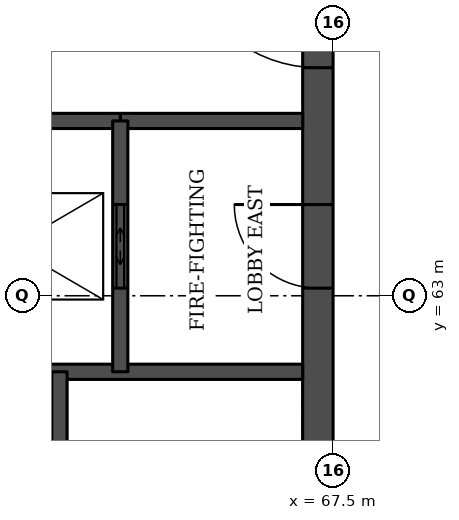
"""IFC4 building model, lengths in metres.
Left out: names, types, materials, properties, quantities, classifications, styles, units other than length and angle.
Written with IfcOpenShell. Run it as: python <this file> out.ifc"""

import sys

from ifc_helpers import new_model, si_unit, direction, frame, frame_2d, origin, place, context, subcontext, project, spatial, rectangle, extrude, element, fill, save


model = new_model("IFC4")
c1 = context("Model", 3, precision=1e-05, world=origin(), true_north=direction((0.0, 1.0)))
c2 = subcontext(c1, "Body", "Model", "MODEL_VIEW")
j1 = project(units=[si_unit("LENGTHUNIT", "METRE"), si_unit("PLANEANGLEUNIT", "RADIAN")], contexts=[c1])
p1 = place(None, origin())
s1 = spatial("IfcSite", under=j1, at=p1, CompositionType="ELEMENT")
p2 = place(p1, origin())
s2 = spatial("IfcBuilding", under=s1, at=p2, CompositionType="ELEMENT")
p3 = place(p2, frame((0.0, 0.0, 188.4)))
s3 = spatial("IfcBuildingStorey", under=s2, at=p3, CompositionType="ELEMENT", Elevation=188.4)
p4 = place(p3, frame((67.3, 49.5, 0.0), z_axis=(0.0, 0.0, 1.0), x_axis=(0.0, 1.0, 0.0)))
e1 = element("IfcWall", 1, at=p4, inside=s3, PredefinedType="SHEAR", context=c2, shape_type="SweptSolid", body=[
    extrude(rectangle(XDim=22.5, YDim=0.4, at=frame_2d((11.25, 0.0))), origin(), (0.0, 0.0, 1.0), 3.7),
])
p5 = place(p4, frame((4.2, 0.0, 0.0)))
e2 = element("IfcOpeningElement", 2, at=p5, cuts=e1, PredefinedType="OPENING", context=c2, shape_type="SweptSolid", body=[
    extrude(rectangle(XDim=1.8, YDim=2.1, at=frame_2d((0.9, 1.05))), frame((0.0, 0.21, 0.0), z_axis=(0.0, -1.0, 0.0), x_axis=(1.0, 0.0, 0.0)), (0.0, 0.0, 1.0), 0.42),
])
p6 = place(p4, frame((6.9, 0.0, 0.0)))
e3 = element("IfcOpeningElement", 3, at=p6, cuts=e1, PredefinedType="OPENING", context=c2, shape_type="SweptSolid", body=[
    extrude(rectangle(XDim=1.1, YDim=2.1, at=frame_2d((0.55, 1.05))), frame((0.0, 0.21, 0.0), z_axis=(0.0, -1.0, 0.0), x_axis=(1.0, 0.0, 0.0)), (0.0, 0.0, 1.0), 0.42),
])
p7 = place(p4, frame((13.6, 0.0, 0.0)))
e4 = element("IfcOpeningElement", 4, at=p7, cuts=e1, PredefinedType="OPENING", context=c2, shape_type="SweptSolid", body=[
    extrude(rectangle(XDim=1.1, YDim=2.1, at=frame_2d((0.55, 1.05))), frame((0.0, 0.21, 0.0), z_axis=(0.0, -1.0, 0.0), x_axis=(1.0, 0.0, 0.0)), (0.0, 0.0, 1.0), 0.42),
])
p8 = place(p4, frame((16.5, 0.0, 0.0)))
e5 = element("IfcOpeningElement", 5, at=p8, cuts=e1, PredefinedType="OPENING", context=c2, shape_type="SweptSolid", body=[
    extrude(rectangle(XDim=1.8, YDim=2.1, at=frame_2d((0.9, 1.05))), frame((0.0, 0.21, 0.0), z_axis=(0.0, -1.0, 0.0), x_axis=(1.0, 0.0, 0.0)), (0.0, 0.0, 1.0), 0.42),
])
p9 = place(p3, frame((61.85, 62.0, 0.0), z_axis=(0.0, 0.0, 1.0), x_axis=(1.0, 0.0, 0.0)))
e6 = element("IfcWall", 6, at=p9, inside=s3, PredefinedType="SOLIDWALL", context=c2, shape_type="SweptSolid", body=[
    extrude(rectangle(XDim=5.25, YDim=0.2, at=frame_2d((2.625, 0.0))), origin(), (0.0, 0.0, 1.0), 3.55),
])
p10 = place(p3, frame((64.7, 65.3, 0.0), z_axis=(0.0, 0.0, 1.0), x_axis=(1.0, 0.0, 0.0)))
e7 = element("IfcWall", 7, at=p10, inside=s3, PredefinedType="SOLIDWALL", context=c2, shape_type="SweptSolid", body=[
    extrude(rectangle(XDim=2.4, YDim=0.2, at=frame_2d((1.2, 0.0))), origin(), (0.0, 0.0, 1.0), 3.55),
])
p11 = place(p3, frame((47.8, 65.3, 0.0), z_axis=(0.0, 0.0, 1.0), x_axis=(1.0, 0.0, 0.0)))
e8 = element("IfcWall", 8, at=p11, inside=s3, PredefinedType="SOLIDWALL", context=c2, shape_type="SweptSolid", body=[
    extrude(rectangle(XDim=16.9, YDim=0.2, at=frame_2d((8.45, 0.0))), origin(), (0.0, 0.0, 1.0), 3.55),
])
p12 = place(p11, frame((3.65, 0.0, 0.0)))
e9 = element("IfcOpeningElement", 9, at=p12, cuts=e8, PredefinedType="OPENING", context=c2, shape_type="SweptSolid", body=[
    extrude(rectangle(XDim=1.2, YDim=2.1, at=frame_2d((0.6, 1.05))), frame((0.0, 0.11, 0.0), z_axis=(0.0, -1.0, 0.0), x_axis=(1.0, 0.0, 0.0)), (0.0, 0.0, 1.0), 0.22),
])
p13 = place(p11, frame((6.45, 0.0, 0.0)))
e10 = element("IfcOpeningElement", 10, at=p13, cuts=e8, PredefinedType="OPENING", context=c2, shape_type="SweptSolid", body=[
    extrude(rectangle(XDim=1.2, YDim=2.1, at=frame_2d((0.6, 1.05))), frame((0.0, 0.11, 0.0), z_axis=(0.0, -1.0, 0.0), x_axis=(1.0, 0.0, 0.0)), (0.0, 0.0, 1.0), 0.22),
])
p14 = place(p11, frame((9.25, 0.0, 0.0)))
e11 = element("IfcOpeningElement", 11, at=p14, cuts=e8, PredefinedType="OPENING", context=c2, shape_type="SweptSolid", body=[
    extrude(rectangle(XDim=1.2, YDim=2.1, at=frame_2d((0.6, 1.05))), frame((0.0, 0.11, 0.0), z_axis=(0.0, -1.0, 0.0), x_axis=(1.0, 0.0, 0.0)), (0.0, 0.0, 1.0), 0.22),
])
p15 = place(p11, frame((12.05, 0.0, 0.0)))
e12 = element("IfcOpeningElement", 12, at=p15, cuts=e8, PredefinedType="OPENING", context=c2, shape_type="SweptSolid", body=[
    extrude(rectangle(XDim=1.2, YDim=2.1, at=frame_2d((0.6, 1.05))), frame((0.0, 0.11, 0.0), z_axis=(0.0, -1.0, 0.0), x_axis=(1.0, 0.0, 0.0)), (0.0, 0.0, 1.0), 0.22),
])
p16 = place(p3, frame((63.9, 56.2, 0.0), z_axis=(0.0, 0.0, 1.0), x_axis=(0.0, 1.0, 0.0)))
e13 = element("IfcWall", 13, at=p16, inside=s3, PredefinedType="SOLIDWALL", context=c2, shape_type="SweptSolid", body=[
    extrude(rectangle(XDim=5.8, YDim=0.2, at=frame_2d((2.9, 0.0))), origin(), (0.0, 0.0, 1.0), 3.55),
])
p17 = place(p3, frame((64.7, 62.0, 0.0), z_axis=(0.0, 0.0, 1.0), x_axis=(0.0, 1.0, 0.0)))
e14 = element("IfcWall", 14, at=p17, inside=s3, PredefinedType="SOLIDWALL", context=c2, shape_type="SweptSolid", body=[
    extrude(rectangle(XDim=3.3, YDim=0.2, at=frame_2d((1.65, 0.0))), origin(), (0.0, 0.0, 1.0), 3.55),
])
p18 = place(p17, frame((1.1, 0.0, 0.0)))
e15 = element("IfcOpeningElement", 15, at=p18, cuts=e14, PredefinedType="OPENING", context=c2, shape_type="SweptSolid", body=[
    extrude(rectangle(XDim=1.1, YDim=2.1, at=frame_2d((0.55, 1.05))), frame((0.0, 0.11, 0.0), z_axis=(0.0, -1.0, 0.0), x_axis=(1.0, 0.0, 0.0)), (0.0, 0.0, 1.0), 0.22),
])
p19 = place(p18, origin())
e16 = element("IfcDoor", 16, at=p19, inside=s3, OperationType="DOUBLE_DOOR_SLIDING", PredefinedType="DOOR", context=c2, shape_type="SweptSolid", body=[
    extrude(rectangle(XDim=1.1, YDim=2.1, at=frame_2d((0.55, 1.05))), frame((0.0, 0.025, 0.0), z_axis=(0.0, -1.0, 0.0), x_axis=(1.0, 0.0, 0.0)), (0.0, 0.0, 1.0), 0.05),
])
fill(e15, e16)
p20 = place(p7, origin())
e17 = element("IfcDoor", 17, at=p20, inside=s3, OperationType="SINGLE_SWING_RIGHT", PredefinedType="DOOR", context=c2, shape_type="SweptSolid", body=[
    extrude(rectangle(XDim=1.1, YDim=2.1, at=frame_2d((0.55, 1.05))), frame((0.0, 0.025, 0.0), z_axis=(0.0, -1.0, 0.0), x_axis=(1.0, 0.0, 0.0)), (0.0, 0.0, 1.0), 0.05),
])
fill(e4, e17)
p21 = place(p8, origin())
e18 = element("IfcDoor", 18, at=p21, inside=s3, OperationType="SINGLE_SWING_RIGHT", PredefinedType="DOOR", context=c2, shape_type="SweptSolid", body=[
    extrude(rectangle(XDim=1.8, YDim=2.1, at=frame_2d((0.9, 1.05))), frame((0.0, 0.025, 0.0), z_axis=(0.0, -1.0, 0.0), x_axis=(1.0, 0.0, 0.0)), (0.0, 0.0, 1.0), 0.05),
])
fill(e5, e18)
save(model, sys.argv[1])
